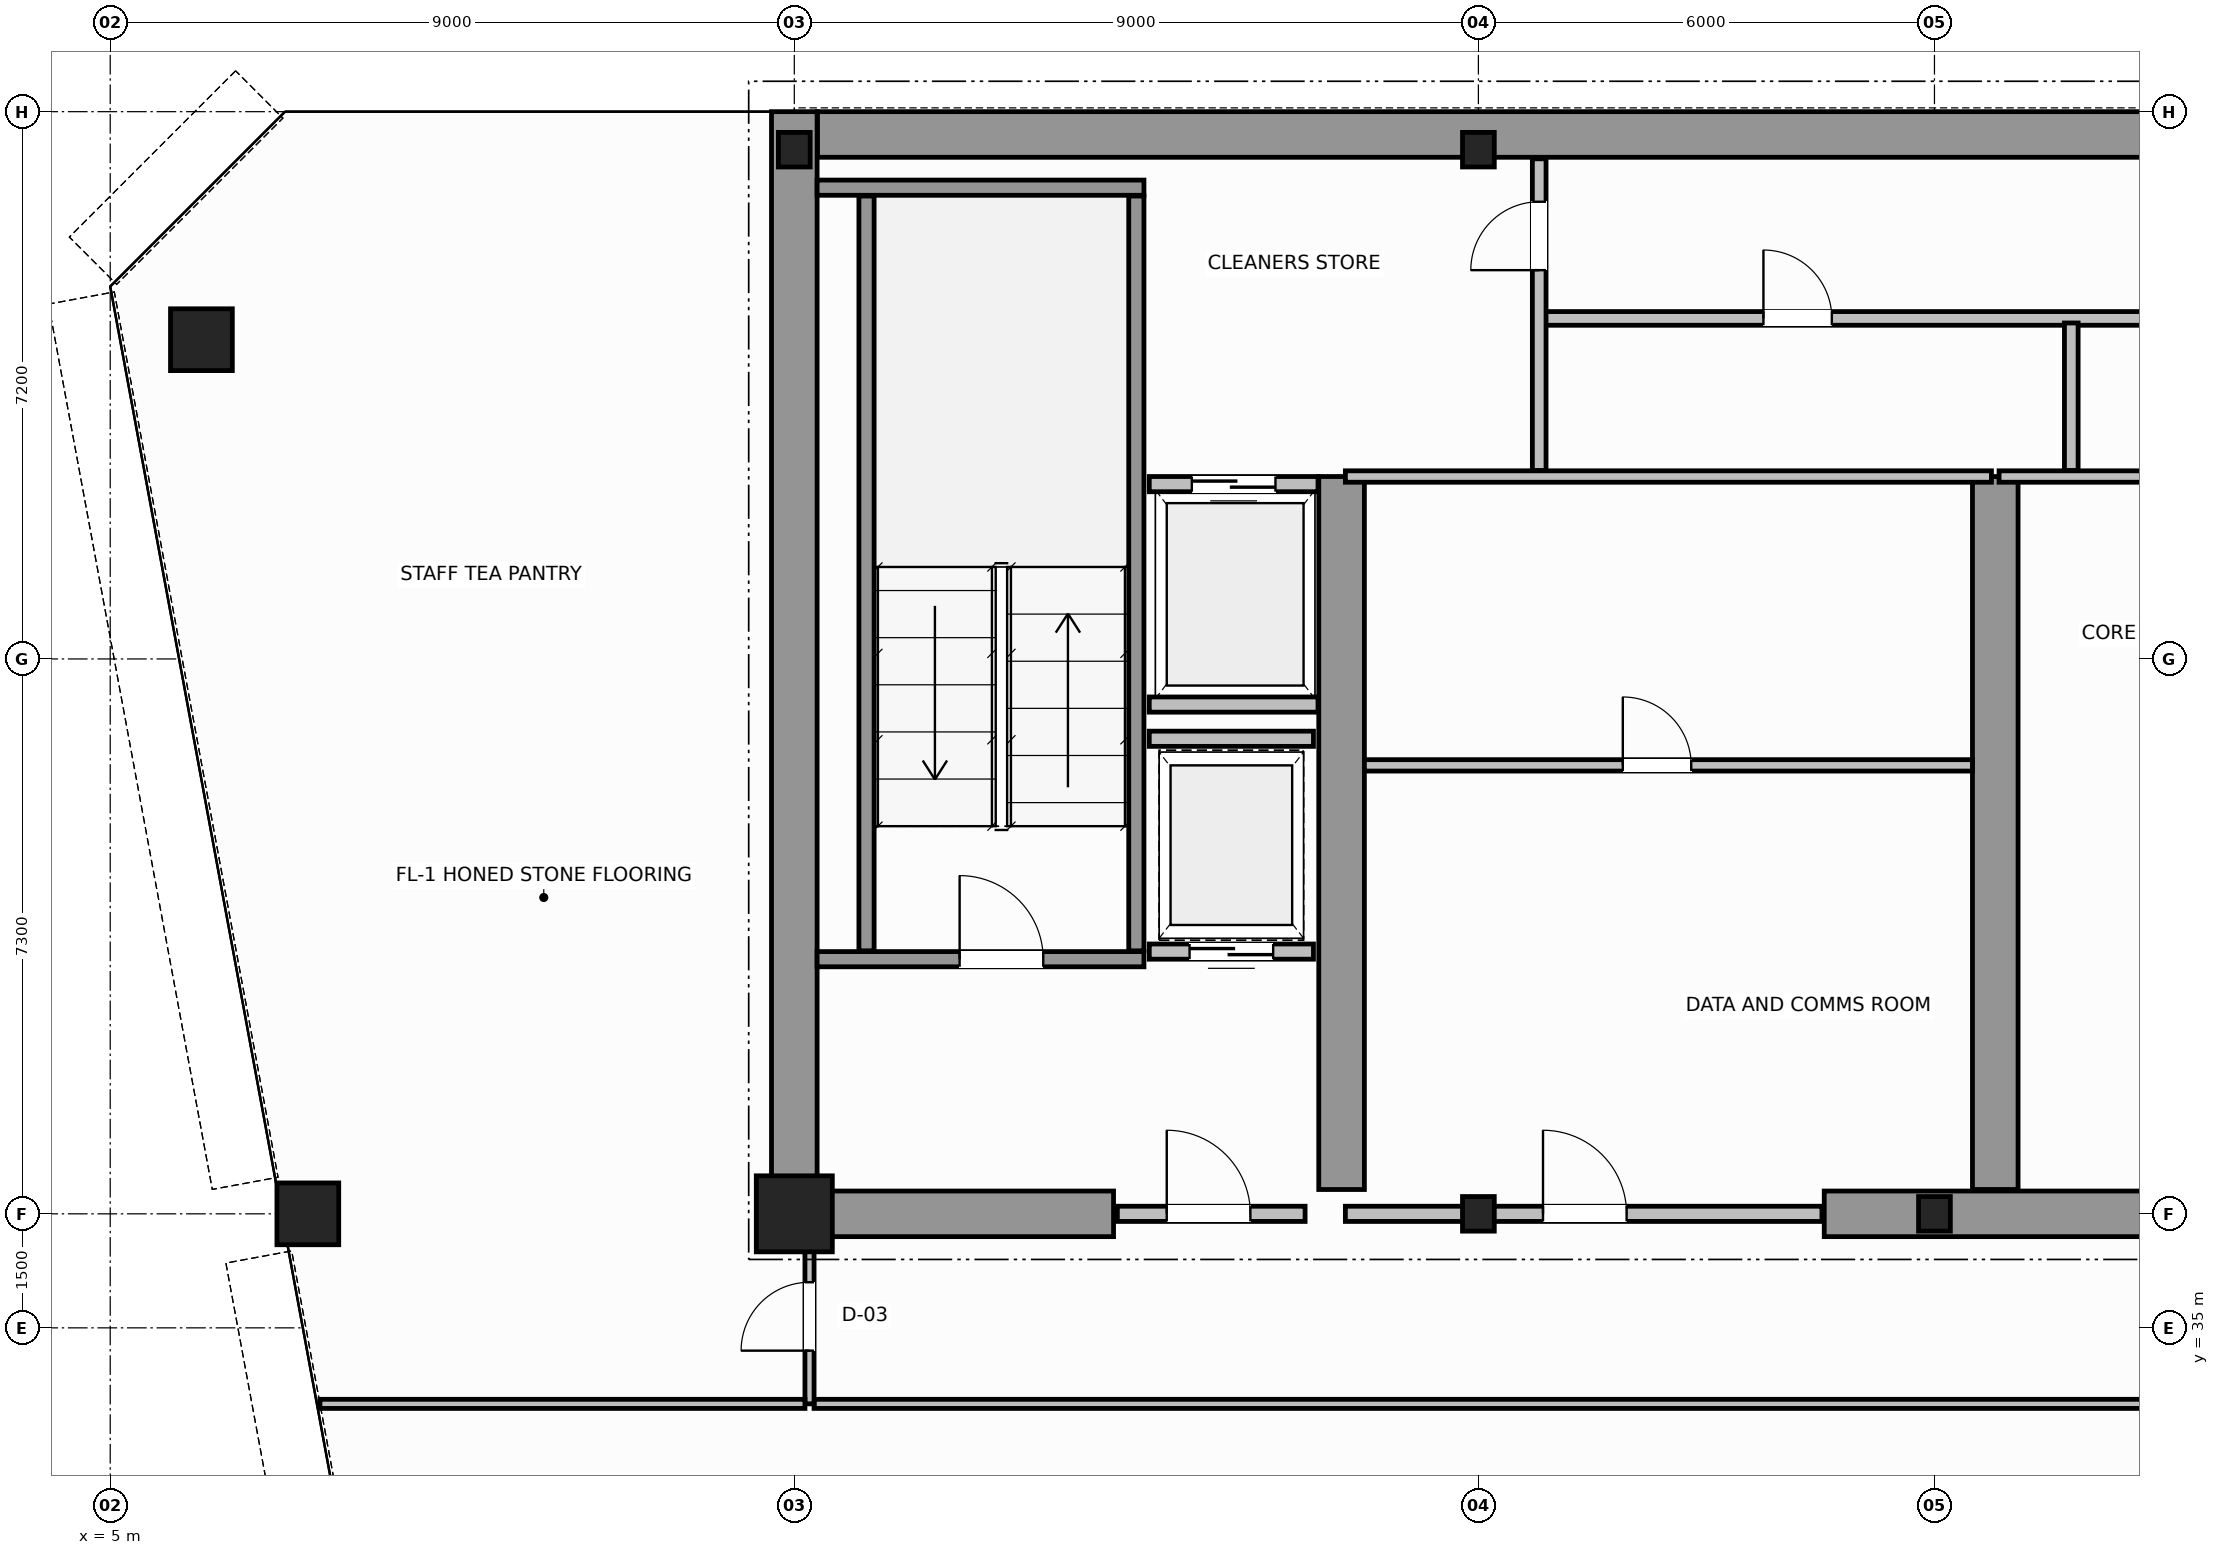
"""IFC4 building model, lengths in metres.
Left out: names, types, materials, properties, quantities, classifications, styles, units other than length and angle.
Written with IfcOpenShell. Run it as: python <this file> out.ifc"""

import sys

from ifc_helpers import new_model, si_unit, direction, frame, frame_2d, origin, origin_2d, place, context, subcontext, project, spatial, rectangle, hollow_circle, i_section, extrude, source, transform, mapped, element, fill, save


model = new_model("IFC4")
c1 = context("Model", 3, precision=1e-05, world=origin(), true_north=direction((0.0, 1.0)))
c2 = subcontext(c1, "Body", "Model", "MODEL_VIEW")
j1 = project(units=[si_unit("LENGTHUNIT", "METRE"), si_unit("PLANEANGLEUNIT", "RADIAN")], contexts=[c1])
p1 = place(None, origin())
s1 = spatial("IfcSite", under=j1, at=p1, CompositionType="ELEMENT")
p2 = place(p1, origin())
s2 = spatial("IfcBuilding", under=s1, at=p2, CompositionType="ELEMENT")
p3 = place(p2, frame((0.0, 0.0, 214.6)))
s3 = spatial("IfcBuildingStorey", under=s2, at=p3, CompositionType="ELEMENT", Elevation=214.6)
m1 = source(origin(), c2, "Body", "SweptSolid", [
    extrude(rectangle(XDim=1.0, YDim=1.0, at=origin_2d()), origin(), (0.0, 0.0, 1.0), 3.8),
])
p4 = place(p3, frame((14.0, 36.5, 0.0), z_axis=(0.0, 0.0, 1.0), x_axis=(1.0, 0.0, 0.0)))
e1 = element("IfcColumn", 1, at=p4, inside=s3, PredefinedType="COLUMN", context=c2, shape_type="MappedRepresentation", body=[
    mapped(m1, transform((0.0, 0.0, 0.0), scale=1.0)),
])
m2 = source(origin(), c2, "Body", "SweptSolid", [
    extrude(i_section(OverallWidth=0.418, OverallDepth=0.455, WebThickness=0.042, FlangeThickness=0.058, FilletRadius=0.015, at=origin_2d()), origin(), (0.0, 0.0, 1.0), 3.8),
])
for number, where, z_axis, x_axis in (
    (2, (23.0, 36.5, 0.0), (0.0, 0.0, 1.0), (1.0, 0.0, 0.0)),
    (3, (29.0, 36.5, 0.0), (0.0, 0.0, 1.0), (1.0, 0.0, 0.0)),
    (4, (14.0, 50.5, 0.0), (0.0, 0.0, 1.0), (1.0, 0.0, 0.0)),
    (5, (23.0, 50.5, 0.0), (0.0, 0.0, 1.0), (1.0, 0.0, 0.0)),
):
    element("IfcColumn", number, at=place(p3, frame(where, z_axis=z_axis, x_axis=x_axis)), inside=s3, PredefinedType="COLUMN", context=c2, shape_type="MappedRepresentation", body=[
        mapped(m2, transform((0.0, 0.0, 0.0), scale=1.0)),
    ])
m3 = source(origin(), c2, "Body", "SweptSolid", [
    extrude(hollow_circle(Radius=0.406, WallThickness=0.04, at=origin_2d()), origin(), (0.0, 0.0, 1.0), 3.8),
])
for number, where, z_axis, x_axis in (
    (6, (6.2, 48.0, 0.0), (0.0, 0.0, 1.0), (1.0, 0.0, 0.0)),
    (7, (7.6, 36.5, 0.0), (0.0, 0.0, 1.0), (1.0, 0.0, 0.0)),
):
    element("IfcColumn", number, at=place(p3, frame(where, z_axis=z_axis, x_axis=x_axis)), inside=s3, PredefinedType="COLUMN", context=c2, shape_type="MappedRepresentation", body=[
        mapped(m3, transform((0.0, 0.0, 0.0), scale=1.0)),
    ])
p5 = place(p3, frame((14.304, 50.7, 0.0), z_axis=(0.0, 0.0, 1.0), x_axis=(1.0, 0.0, 0.0)))
e8 = element("IfcWall", 8, at=p5, inside=s3, PredefinedType="SHEAR", context=c2, shape_type="SweptSolid", body=[
    extrude(rectangle(XDim=19.694, YDim=0.6, at=frame_2d((9.847, 0.0))), origin(), (0.0, 0.0, 1.0), 3.8),
])
p6 = place(p3, frame((14.0, 36.5, 0.0), z_axis=(0.0, 0.0, 1.0), x_axis=(0.0, 1.0, 0.0)))
e9 = element("IfcWall", 9, at=p6, inside=s3, PredefinedType="SHEAR", context=c2, shape_type="SweptSolid", body=[
    extrude(rectangle(XDim=14.5, YDim=0.6, at=frame_2d((7.25, 0.0))), origin(), (0.0, 0.0, 1.0), 3.8),
])
p7 = place(p3, frame((14.32, 36.5, 0.0), z_axis=(0.0, 0.0, 1.0), x_axis=(1.0, 0.0, 0.0)))
e10 = element("IfcWall", 10, at=p7, inside=s3, PredefinedType="SHEAR", context=c2, shape_type="SweptSolid", body=[
    extrude(rectangle(XDim=3.88, YDim=0.6, at=frame_2d((1.94, 0.0))), origin(), (0.0, 0.0, 1.0), 2.54),
])
p8 = place(p3, frame((27.55, 36.5, 0.0), z_axis=(0.0, 0.0, 1.0), x_axis=(1.0, 0.0, 0.0)))
e11 = element("IfcWall", 11, at=p8, inside=s3, PredefinedType="SHEAR", context=c2, shape_type="SweptSolid", body=[
    extrude(rectangle(XDim=4.5, YDim=0.6, at=frame_2d((2.25, 0.0))), origin(), (0.0, 0.0, 1.0), 3.8),
])
for number, where, z_axis, x_axis in (
    (12, (21.2, 36.82, 0.0), (0.0, 0.0, 1.0), (0.0, 1.0, 0.0)),
    (13, (29.8, 36.82, 0.0), (0.0, 0.0, 1.0), (0.0, 1.0, 0.0)),
):
    element("IfcWall", number, at=place(p3, frame(where, z_axis=z_axis, x_axis=x_axis)), inside=s3, PredefinedType="SHEAR", context=c2, shape_type="SweptSolid", body=[
        extrude(rectangle(XDim=9.38, YDim=0.6, at=frame_2d((4.69, 0.0))), origin(), (0.0, 0.0, 1.0), 3.8),
    ])
p9 = place(p3, frame((14.3, 39.85, 0.0), z_axis=(0.0, 0.0, 1.0), x_axis=(1.0, 0.0, 0.0)))
e14 = element("IfcWall", 14, at=p9, inside=s3, PredefinedType="SOLIDWALL", context=c2, shape_type="SweptSolid", body=[
    extrude(rectangle(XDim=4.3, YDim=0.2, at=frame_2d((2.15, 0.0))), origin(), (0.0, 0.0, 1.0), 3.8),
])
p10 = place(p9, frame((1.875, 0.0, 0.0)))
e15 = element("IfcOpeningElement", 15, at=p10, cuts=e14, PredefinedType="OPENING", context=c2, shape_type="SweptSolid", body=[
    extrude(rectangle(XDim=1.1, YDim=2.15, at=frame_2d((0.55, 1.075))), frame((0.0, 0.11, 0.0), z_axis=(0.0, -1.0, 0.0), x_axis=(1.0, 0.0, 0.0)), (0.0, 0.0, 1.0), 0.22),
])
p11 = place(p3, frame((14.3, 50.0, 0.0), z_axis=(0.0, 0.0, 1.0), x_axis=(1.0, 0.0, 0.0)))
e16 = element("IfcWall", 16, at=p11, inside=s3, PredefinedType="SOLIDWALL", context=c2, shape_type="SweptSolid", body=[
    extrude(rectangle(XDim=4.3, YDim=0.2, at=frame_2d((2.15, 0.0))), origin(), (0.0, 0.0, 1.0), 3.8),
])
for number, where, z_axis, x_axis in (
    (17, (14.95, 39.96, 0.0), (0.0, 0.0, 1.0), (0.0, 1.0, 0.0)),
    (18, (18.5, 39.96, 0.0), (0.0, 0.0, 1.0), (0.0, 1.0, 0.0)),
):
    element("IfcWall", number, at=place(p3, frame(where, z_axis=z_axis, x_axis=x_axis)), inside=s3, PredefinedType="SOLIDWALL", context=c2, shape_type="SweptSolid", body=[
        extrude(rectangle(XDim=9.93, YDim=0.2, at=frame_2d((4.965, 0.0))), origin(), (0.0, 0.0, 1.0), 3.8),
    ])
p12 = place(p3, frame((18.25, 36.5, 0.0), z_axis=(0.0, 0.0, 1.0), x_axis=(1.0, 0.0, 0.0)))
e19 = element("IfcWall", 19, at=p12, inside=s3, PredefinedType="SOLIDWALL", context=c2, shape_type="SweptSolid", body=[
    extrude(rectangle(XDim=2.47, YDim=0.2, at=frame_2d((1.235, 0.0))), origin(), (0.0, 0.0, 1.0), 2.53),
])
p13 = place(p12, frame((0.65, 0.0, 0.0)))
e20 = element("IfcOpeningElement", 20, at=p13, cuts=e19, PredefinedType="OPENING", context=c2, shape_type="SweptSolid", body=[
    extrude(rectangle(XDim=1.1, YDim=2.15, at=frame_2d((0.55, 1.075))), frame((0.0, 0.11, 0.0), z_axis=(0.0, -1.0, 0.0), x_axis=(1.0, 0.0, 0.0)), (0.0, 0.0, 1.0), 0.22),
])
p14 = place(p3, frame((18.67, 46.1, 0.0), z_axis=(0.0, 0.0, 1.0), x_axis=(1.0, 0.0, 0.0)))
e21 = element("IfcWall", 21, at=p14, inside=s3, PredefinedType="SOLIDWALL", context=c2, shape_type="SweptSolid", body=[
    extrude(rectangle(XDim=2.22, YDim=0.2, at=frame_2d((1.11, 0.0))), origin(), (0.0, 0.0, 1.0), 3.54),
])
p15 = place(p14, frame((0.56, 0.0, 0.0)))
e22 = element("IfcOpeningElement", 22, at=p15, cuts=e21, PredefinedType="OPENING", context=c2, shape_type="SweptSolid", body=[
    extrude(rectangle(XDim=1.1, YDim=2.15, at=frame_2d((0.55, 1.075))), frame((0.0, 0.11, 0.0), z_axis=(0.0, -1.0, 0.0), x_axis=(1.0, 0.0, 0.0)), (0.0, 0.0, 1.0), 0.22),
])
p16 = place(p3, frame((18.67, 43.2, 0.0), z_axis=(0.0, 0.0, 1.0), x_axis=(1.0, 0.0, 0.0)))
e23 = element("IfcWall", 23, at=p16, inside=s3, PredefinedType="SOLIDWALL", context=c2, shape_type="SweptSolid", body=[
    extrude(rectangle(XDim=2.22, YDim=0.2, at=frame_2d((1.11, 0.0))), origin(), (0.0, 0.0, 1.0), 3.54),
])
p17 = place(p3, frame((18.67, 39.95, 0.0), z_axis=(0.0, 0.0, 1.0), x_axis=(1.0, 0.0, 0.0)))
e24 = element("IfcWall", 24, at=p17, inside=s3, PredefinedType="SOLIDWALL", context=c2, shape_type="SweptSolid", body=[
    extrude(rectangle(XDim=2.16, YDim=0.2, at=frame_2d((1.08, 0.0))), origin(), (0.0, 0.0, 1.0), 3.54),
])
p18 = place(p17, frame((0.53, 0.0, 0.0)))
e25 = element("IfcOpeningElement", 25, at=p18, cuts=e24, PredefinedType="OPENING", context=c2, shape_type="SweptSolid", body=[
    extrude(rectangle(XDim=1.1, YDim=2.15, at=frame_2d((0.55, 1.075))), frame((0.0, 0.11, 0.0), z_axis=(0.0, -1.0, 0.0), x_axis=(1.0, 0.0, 0.0)), (0.0, 0.0, 1.0), 0.22),
])
p19 = place(p3, frame((18.67, 42.75, 0.0), z_axis=(0.0, 0.0, 1.0), x_axis=(1.0, 0.0, 0.0)))
e26 = element("IfcWall", 26, at=p19, inside=s3, PredefinedType="SOLIDWALL", context=c2, shape_type="SweptSolid", body=[
    extrude(rectangle(XDim=2.16, YDim=0.2, at=frame_2d((1.08, 0.0))), origin(), (0.0, 0.0, 1.0), 3.54),
])
p20 = place(p3, frame((21.25, 36.5, 0.0), z_axis=(0.0, 0.0, 1.0), x_axis=(1.0, 0.0, 0.0)))
e27 = element("IfcWall", 27, at=p20, inside=s3, PredefinedType="SOLIDWALL", context=c2, shape_type="SweptSolid", body=[
    extrude(rectangle(XDim=6.27, YDim=0.2, at=frame_2d((3.135, 0.0))), origin(), (0.0, 0.0, 1.0), 2.53),
])
p21 = place(p20, frame((2.6, 0.0, 0.0)))
e28 = element("IfcOpeningElement", 28, at=p21, cuts=e27, PredefinedType="OPENING", context=c2, shape_type="SweptSolid", body=[
    extrude(rectangle(XDim=1.1, YDim=2.15, at=frame_2d((0.55, 1.075))), frame((0.0, 0.11, 0.0), z_axis=(0.0, -1.0, 0.0), x_axis=(1.0, 0.0, 0.0)), (0.0, 0.0, 1.0), 0.22),
])
p22 = place(p3, frame((21.25, 46.2, 0.0), z_axis=(0.0, 0.0, 1.0), x_axis=(1.0, 0.0, 0.0)))
e29 = element("IfcWall", 29, at=p22, inside=s3, PredefinedType="PARTITIONING", context=c2, shape_type="SweptSolid", body=[
    extrude(rectangle(XDim=8.5, YDim=0.15, at=frame_2d((4.25, 0.0))), origin(), (0.0, 0.0, 1.0), 3.54),
])
p23 = place(p3, frame((21.5, 42.4, 0.0), z_axis=(0.0, 0.0, 1.0), x_axis=(1.0, 0.0, 0.0)))
e30 = element("IfcWall", 30, at=p23, inside=s3, PredefinedType="PARTITIONING", context=c2, shape_type="SweptSolid", body=[
    extrude(rectangle(XDim=8.0, YDim=0.15, at=frame_2d((4.0, 0.0))), origin(), (0.0, 0.0, 1.0), 3.54),
])
p24 = place(p23, frame((3.4, 0.0, 0.0)))
e31 = element("IfcOpeningElement", 31, at=p24, cuts=e30, PredefinedType="OPENING", context=c2, shape_type="SweptSolid", body=[
    extrude(rectangle(XDim=0.9, YDim=2.1, at=frame_2d((0.45, 1.05))), frame((0.0, 0.085, 0.0), z_axis=(0.0, -1.0, 0.0), x_axis=(1.0, 0.0, 0.0)), (0.0, 0.0, 1.0), 0.17),
])
p25 = place(p3, frame((29.85, 46.2, 0.0), z_axis=(0.0, 0.0, 1.0), x_axis=(1.0, 0.0, 0.0)))
e32 = element("IfcWall", 32, at=p25, inside=s3, PredefinedType="PARTITIONING", context=c2, shape_type="SweptSolid", body=[
    extrude(rectangle(XDim=8.5, YDim=0.15, at=frame_2d((4.25, 0.0))), origin(), (0.0, 0.0, 1.0), 3.54),
])
p26 = place(p3, frame((23.85, 48.28, 0.0), z_axis=(0.0, 0.0, 1.0), x_axis=(1.0, 0.0, 0.0)))
e33 = element("IfcWall", 33, at=p26, inside=s3, PredefinedType="PLUMBINGWALL", context=c2, shape_type="SweptSolid", body=[
    extrude(rectangle(XDim=15.03, YDim=0.18, at=frame_2d((7.515, 0.0))), origin(), (0.0, 0.0, 1.0), 3.54),
])
p27 = place(p26, frame((2.9, 0.0, 0.0)))
e34 = element("IfcOpeningElement", 34, at=p27, cuts=e33, PredefinedType="OPENING", context=c2, shape_type="SweptSolid", body=[
    extrude(rectangle(XDim=0.9, YDim=2.15, at=frame_2d((0.45, 1.075))), frame((0.0, 0.1, 0.0), z_axis=(0.0, -1.0, 0.0), x_axis=(1.0, 0.0, 0.0)), (0.0, 0.0, 1.0), 0.2),
])
p28 = place(p26, frame((10.4, 0.0, 0.0)))
e35 = element("IfcOpeningElement", 35, at=p28, cuts=e33, PredefinedType="OPENING", context=c2, shape_type="SweptSolid", body=[
    extrude(rectangle(XDim=0.9, YDim=2.15, at=frame_2d((0.45, 1.075))), frame((0.0, 0.1, 0.0), z_axis=(0.0, -1.0, 0.0), x_axis=(1.0, 0.0, 0.0)), (0.0, 0.0, 1.0), 0.2),
])
p29 = place(p3, frame((23.8, 46.28, 0.0), z_axis=(0.0, 0.0, 1.0), x_axis=(0.0, 1.0, 0.0)))
e36 = element("IfcWall", 36, at=p29, inside=s3, PredefinedType="PLUMBINGWALL", context=c2, shape_type="SweptSolid", body=[
    extrude(rectangle(XDim=4.1, YDim=0.18, at=frame_2d((2.05, 0.0))), origin(), (0.0, 0.0, 1.0), 3.54),
])
p30 = place(p29, frame((2.635, 0.0, 0.0)))
e37 = element("IfcOpeningElement", 37, at=p30, cuts=e36, PredefinedType="OPENING", context=c2, shape_type="SweptSolid", body=[
    extrude(rectangle(XDim=0.9, YDim=2.15, at=frame_2d((0.45, 1.075))), frame((0.0, 0.1, 0.0), z_axis=(0.0, -1.0, 0.0), x_axis=(1.0, 0.0, 0.0)), (0.0, 0.0, 1.0), 0.2),
])
p31 = place(p3, frame((30.8, 46.28, 0.0), z_axis=(0.0, 0.0, 1.0), x_axis=(0.0, 1.0, 0.0)))
e38 = element("IfcWall", 38, at=p31, inside=s3, PredefinedType="PLUMBINGWALL", context=c2, shape_type="SweptSolid", body=[
    extrude(rectangle(XDim=1.94, YDim=0.18, at=frame_2d((0.97, 0.0))), origin(), (0.0, 0.0, 1.0), 3.54),
])
p32 = place(p3, frame((14.26, 34.0, 0.0), z_axis=(0.0, 0.0, 1.0), x_axis=(1.0, 0.0, 0.0)))
e39 = element("IfcWall", 39, at=p32, inside=s3, PredefinedType="PARTITIONING", context=c2, shape_type="SweptSolid", body=[
    extrude(rectangle(XDim=26.48, YDim=0.12, at=frame_2d((13.24, 0.0))), origin(), (0.0, 0.0, 1.0), 3.54),
])
p33 = place(p3, frame((14.2, 34.0, 0.0), z_axis=(0.0, 0.0, 1.0), x_axis=(0.0, 1.0, 0.0)))
e40 = element("IfcWall", 40, at=p33, inside=s3, PredefinedType="PARTITIONING", context=c2, shape_type="SweptSolid", body=[
    extrude(rectangle(XDim=2.44, YDim=0.12, at=frame_2d((1.22, 0.0))), origin(), (0.0, 0.0, 1.0), 3.54),
])
p34 = place(p33, frame((0.7, 0.0, 0.0)))
e41 = element("IfcOpeningElement", 41, at=p34, cuts=e40, PredefinedType="OPENING", context=c2, shape_type="SweptSolid", body=[
    extrude(rectangle(XDim=0.9, YDim=2.15, at=frame_2d((0.45, 1.075))), frame((0.0, 0.07, 0.0), z_axis=(0.0, -1.0, 0.0), x_axis=(1.0, 0.0, 0.0)), (0.0, 0.0, 1.0), 0.14),
])
p35 = place(p3, frame((7.759, 34.0, 0.0), z_axis=(0.0, 0.0, 1.0), x_axis=(1.0, 0.0, 0.0)))
e42 = element("IfcWall", 42, at=p35, inside=s3, PredefinedType="PARTITIONING", context=c2, shape_type="SweptSolid", body=[
    extrude(rectangle(XDim=6.381, YDim=0.12, at=frame_2d((3.19, 0.0))), origin(), (0.0, 0.0, 1.0), 3.54),
])
m4 = source(origin(), c2, "Body", "SweptSolid", [
    extrude(rectangle(XDim=1.1, YDim=2.15, at=frame_2d((0.55, 1.075))), frame((0.0, 0.025, 0.0), z_axis=(0.0, -1.0, 0.0), x_axis=(1.0, 0.0, 0.0)), (0.0, 0.0, 1.0), 0.05),
])
p36 = place(p10, origin())
e43 = element("IfcDoor", 43, at=p36, inside=s3, OperationType="SINGLE_SWING_LEFT", PredefinedType="DOOR", context=c2, shape_type="MappedRepresentation", body=[
    mapped(m4, transform((0.0, 0.0, 0.0), scale=1.0)),
])
fill(e15, e43)
p37 = place(p13, origin())
e44 = element("IfcDoor", 44, at=p37, inside=s3, OperationType="SINGLE_SWING_RIGHT", PredefinedType="DOOR", context=c2, shape_type="MappedRepresentation", body=[
    mapped(m4, transform((0.0, 0.0, 0.0), scale=1.0)),
])
fill(e20, e44)
p38 = place(p15, origin())
e45 = element("IfcDoor", 45, at=p38, inside=s3, OperationType="DOUBLE_DOOR_SLIDING", PredefinedType="DOOR", context=c2, shape_type="MappedRepresentation", body=[
    mapped(m4, transform((0.0, 0.0, 0.0), scale=1.0)),
])
fill(e22, e45)
p39 = place(p18, origin())
e46 = element("IfcDoor", 46, at=p39, inside=s3, OperationType="DOUBLE_DOOR_SLIDING", PredefinedType="DOOR", context=c2, shape_type="MappedRepresentation", body=[
    mapped(m4, transform((0.0, 0.0, 0.0), scale=1.0)),
])
fill(e25, e46)
p40 = place(p21, origin())
e47 = element("IfcDoor", 47, at=p40, inside=s3, OperationType="SINGLE_SWING_LEFT", PredefinedType="DOOR", context=c2, shape_type="MappedRepresentation", body=[
    mapped(m4, transform((0.0, 0.0, 0.0), scale=1.0)),
])
fill(e28, e47)
m5 = source(origin(), c2, "Body", "SweptSolid", [
    extrude(rectangle(XDim=0.9, YDim=2.1, at=frame_2d((0.45, 1.05))), frame((0.0, 0.025, 0.0), z_axis=(0.0, -1.0, 0.0), x_axis=(1.0, 0.0, 0.0)), (0.0, 0.0, 1.0), 0.05),
])
p41 = place(p24, origin())
e48 = element("IfcDoor", 48, at=p41, inside=s3, OperationType="SINGLE_SWING_RIGHT", PredefinedType="DOOR", context=c2, shape_type="MappedRepresentation", body=[
    mapped(m5, transform((0.0, 0.0, 0.0), scale=1.0)),
])
fill(e31, e48)
m6 = source(origin(), c2, "Body", "SweptSolid", [
    extrude(rectangle(XDim=0.9, YDim=2.15, at=frame_2d((0.45, 1.075))), frame((0.0, 0.025, 0.0), z_axis=(0.0, -1.0, 0.0), x_axis=(1.0, 0.0, 0.0)), (0.0, 0.0, 1.0), 0.05),
])
p42 = place(p30, origin())
e49 = element("IfcDoor", 49, at=p42, inside=s3, OperationType="SINGLE_SWING_LEFT", PredefinedType="DOOR", context=c2, shape_type="MappedRepresentation", body=[
    mapped(m6, transform((0.0, 0.0, 0.0), scale=1.0)),
])
fill(e37, e49)
p43 = place(p27, origin())
e50 = element("IfcDoor", 50, at=p43, inside=s3, OperationType="SINGLE_SWING_RIGHT", PredefinedType="DOOR", context=c2, shape_type="MappedRepresentation", body=[
    mapped(m6, transform((0.0, 0.0, 0.0), scale=1.0)),
])
fill(e34, e50)
p44 = place(p34, origin())
e51 = element("IfcDoor", 51, at=p44, inside=s3, OperationType="SINGLE_SWING_LEFT", PredefinedType="DOOR", context=c2, shape_type="MappedRepresentation", body=[
    mapped(m6, transform((0.0, 0.0, 0.0), scale=1.0)),
])
fill(e41, e51)
save(model, sys.argv[1])
